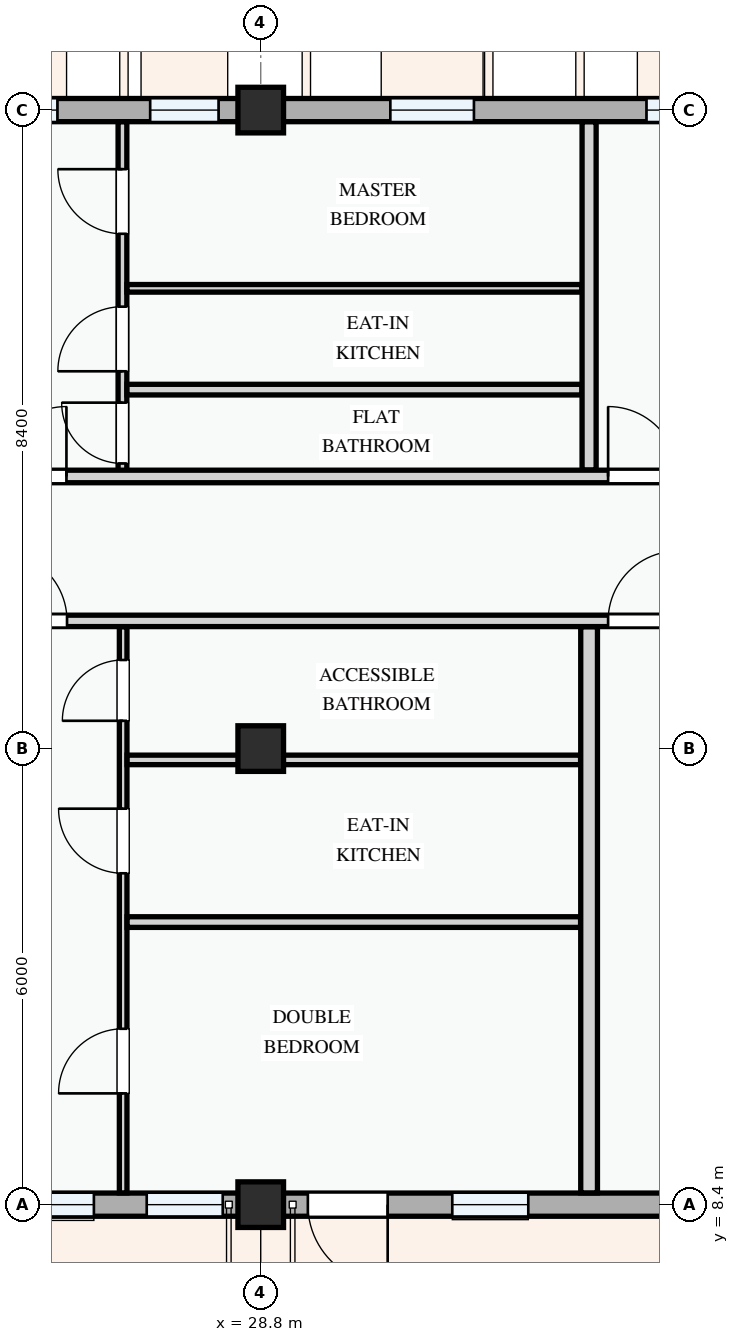
"""IFC4 building model, lengths in metres.
Left out: names, types, materials, properties, quantities, classifications, styles, units other than length and angle.
Written with IfcOpenShell. Run it as: python <this file> out.ifc"""

import sys

from ifc_helpers import new_model, si_unit, direction, frame, frame_2d, origin, origin_2d, place, context, subcontext, project, spatial, rectangle, extrude, element, fill, save


model = new_model("IFC4")
c1 = context("Model", 3, precision=1e-05, world=origin(), true_north=direction((0.0, 1.0)))
c2 = subcontext(c1, "Body", "Model", "MODEL_VIEW")
j1 = project(units=[si_unit("LENGTHUNIT", "METRE"), si_unit("PLANEANGLEUNIT", "RADIAN")], contexts=[c1])
p1 = place(None, origin())
s1 = spatial("IfcSite", under=j1, at=p1, CompositionType="ELEMENT")
p2 = place(p1, origin())
s2 = spatial("IfcBuilding", under=s1, at=p2, CompositionType="ELEMENT")
p3 = place(p2, frame((0.0, 0.0, 18.0)))
s3 = spatial("IfcBuildingStorey", under=s2, at=p3, CompositionType="ELEMENT", Elevation=18.0)
for number, where, z_axis, x_axis in (
    (1, (28.8, 8.4, 0.0), (0.0, 0.0, 1.0), (1.0, 0.0, 0.0)),
    (2, (28.8, 14.4, 0.0), (0.0, 0.0, 1.0), (1.0, 0.0, 0.0)),
    (3, (28.8, 22.8, 0.0), (0.0, 0.0, 1.0), (1.0, 0.0, 0.0)),
):
    element("IfcColumn", number, at=place(p3, frame(where, z_axis=z_axis, x_axis=x_axis)), inside=s3, PredefinedType="COLUMN", context=c2, shape_type="SweptSolid", body=[
        extrude(rectangle(XDim=0.6, YDim=0.6, at=origin_2d()), origin(), (0.0, 0.0, 1.0), 3.3),
    ])
p4 = place(p3, frame((22.8, 8.4, 0.0), z_axis=(0.0, 0.0, 1.0), x_axis=(1.0, 0.0, 0.0)))
e4 = element("IfcWall", 4, at=p4, inside=s3, PredefinedType="STANDARD", context=c2, shape_type="SweptSolid", body=[
    extrude(rectangle(XDim=6.0, YDim=0.305, at=frame_2d((3.0, 0.0))), origin(), (0.0, 0.0, 1.0), 2.475),
])
p5 = place(p4, frame((0.62, 0.0, 0.0)))
e5 = element("IfcOpeningElement", 5, at=p5, cuts=e4, PredefinedType="OPENING", context=c2, shape_type="SweptSolid", body=[
    extrude(rectangle(XDim=1.6, YDim=2.2, at=frame_2d((0.8, 1.1))), frame((0.0, 0.163, 0.0), z_axis=(0.0, -1.0, 0.0), x_axis=(1.0, 0.0, 0.0)), (0.0, 0.0, 1.0), 0.325),
])
p6 = place(p4, frame((2.655, 0.0, 0.78)))
e6 = element("IfcOpeningElement", 6, at=p6, cuts=e4, PredefinedType="OPENING", context=c2, shape_type="SweptSolid", body=[
    extrude(rectangle(XDim=1.15, YDim=1.25, at=frame_2d((0.575, 0.625))), frame((0.0, 0.163, 0.0), z_axis=(0.0, -1.0, 0.0), x_axis=(1.0, 0.0, 0.0)), (0.0, 0.0, 1.0), 0.325),
])
p7 = place(p4, frame((4.5, 0.0, 0.78)))
e7 = element("IfcOpeningElement", 7, at=p7, cuts=e4, PredefinedType="OPENING", context=c2, shape_type="SweptSolid", body=[
    extrude(rectangle(XDim=1.0, YDim=1.25, at=frame_2d((0.5, 0.625))), frame((0.0, 0.163, 0.0), z_axis=(0.0, -1.0, 0.0), x_axis=(1.0, 0.0, 0.0)), (0.0, 0.0, 1.0), 0.325),
])
p8 = place(p3, frame((28.8, 8.4, 0.0), z_axis=(0.0, 0.0, 1.0), x_axis=(1.0, 0.0, 0.0)))
e8 = element("IfcWall", 8, at=p8, inside=s3, PredefinedType="STANDARD", context=c2, shape_type="SweptSolid", body=[
    extrude(rectangle(XDim=8.4, YDim=0.305, at=frame_2d((4.2, 0.0))), origin(), (0.0, 0.0, 1.0), 2.375),
])
p9 = place(p8, frame((0.62, 0.0, 0.0)))
e9 = element("IfcOpeningElement", 9, at=p9, cuts=e8, PredefinedType="OPENING", context=c2, shape_type="SweptSolid", body=[
    extrude(rectangle(XDim=1.05, YDim=2.15, at=frame_2d((0.525, 1.075))), frame((0.0, 0.163, 0.0), z_axis=(0.0, -1.0, 0.0), x_axis=(1.0, 0.0, 0.0)), (0.0, 0.0, 1.0), 0.325),
])
p10 = place(p8, frame((2.52, 0.0, 0.78)))
e10 = element("IfcOpeningElement", 10, at=p10, cuts=e8, PredefinedType="OPENING", context=c2, shape_type="SweptSolid", body=[
    extrude(rectangle(XDim=1.0, YDim=1.25, at=frame_2d((0.5, 0.625))), frame((0.0, 0.163, 0.0), z_axis=(0.0, -1.0, 0.0), x_axis=(1.0, 0.0, 0.0)), (0.0, 0.0, 1.0), 0.325),
])
p11 = place(p8, frame((5.615, 0.0, 0.78)))
e11 = element("IfcOpeningElement", 11, at=p11, cuts=e8, PredefinedType="OPENING", context=c2, shape_type="SweptSolid", body=[
    extrude(rectangle(XDim=1.3, YDim=1.4, at=frame_2d((0.65, 0.7))), frame((0.0, 0.163, 0.0), z_axis=(0.0, -1.0, 0.0), x_axis=(1.0, 0.0, 0.0)), (0.0, 0.0, 1.0), 0.325),
])
p12 = place(p3, frame((37.2, 22.8, 0.0), z_axis=(0.0, 0.0, 1.0), x_axis=(-1.0, 0.0, 0.0)))
e12 = element("IfcWall", 12, at=p12, inside=s3, PredefinedType="STANDARD", context=c2, shape_type="SweptSolid", body=[
    extrude(rectangle(XDim=8.4, YDim=0.305, at=frame_2d((4.2, 0.0))), origin(), (0.0, 0.0, 1.0), 2.375),
])
p13 = place(p12, frame((0.945, 0.0, 0.78)))
e13 = element("IfcOpeningElement", 13, at=p13, cuts=e12, PredefinedType="OPENING", context=c2, shape_type="SweptSolid", body=[
    extrude(rectangle(XDim=2.38, YDim=1.48, at=frame_2d((1.19, 0.74))), frame((0.0, 0.163, 0.0), z_axis=(0.0, -1.0, 0.0), x_axis=(1.0, 0.0, 0.0)), (0.0, 0.0, 1.0), 0.325),
])
p14 = place(p12, frame((5.595, 0.0, 0.78)))
e14 = element("IfcOpeningElement", 14, at=p14, cuts=e12, PredefinedType="OPENING", context=c2, shape_type="SweptSolid", body=[
    extrude(rectangle(XDim=1.1, YDim=1.3, at=frame_2d((0.55, 0.65))), frame((0.0, 0.163, 0.0), z_axis=(0.0, -1.0, 0.0), x_axis=(1.0, 0.0, 0.0)), (0.0, 0.0, 1.0), 0.325),
])
p15 = place(p3, frame((28.8, 22.8, 0.0), z_axis=(0.0, 0.0, 1.0), x_axis=(-1.0, 0.0, 0.0)))
e15 = element("IfcWall", 15, at=p15, inside=s3, PredefinedType="STANDARD", context=c2, shape_type="SweptSolid", body=[
    extrude(rectangle(XDim=6.0, YDim=0.305, at=frame_2d((3.0, 0.0))), origin(), (0.0, 0.0, 1.0), 2.475),
])
p16 = place(p15, frame((0.555, 0.0, 0.78)))
e16 = element("IfcOpeningElement", 16, at=p16, cuts=e15, PredefinedType="OPENING", context=c2, shape_type="SweptSolid", body=[
    extrude(rectangle(XDim=0.9, YDim=1.2, at=frame_2d((0.45, 0.6))), frame((0.0, 0.163, 0.0), z_axis=(0.0, -1.0, 0.0), x_axis=(1.0, 0.0, 0.0)), (0.0, 0.0, 1.0), 0.325),
])
p17 = place(p15, frame((2.675, 0.0, 0.78)))
e17 = element("IfcOpeningElement", 17, at=p17, cuts=e15, PredefinedType="OPENING", context=c2, shape_type="SweptSolid", body=[
    extrude(rectangle(XDim=2.28, YDim=1.46, at=frame_2d((1.14, 0.73))), frame((0.0, 0.163, 0.0), z_axis=(0.0, -1.0, 0.0), x_axis=(1.0, 0.0, 0.0)), (0.0, 0.0, 1.0), 0.325),
])
p18 = place(p3, frame((26.99, 8.554, 0.0), z_axis=(0.0, 0.0, 1.0), x_axis=(0.0, 1.0, 0.0)))
e18 = element("IfcWall", 18, at=p18, inside=s3, PredefinedType="PARTITIONING", context=c2, shape_type="SweptSolid", body=[
    extrude(rectangle(XDim=7.448, YDim=0.1, at=frame_2d((3.724, 0.0))), origin(), (0.0, 0.0, 1.0), 3.0),
])
p19 = place(p18, frame((1.309, 0.0, 0.0)))
e19 = element("IfcOpeningElement", 19, at=p19, cuts=e18, PredefinedType="OPENING", context=c2, shape_type="SweptSolid", body=[
    extrude(rectangle(XDim=0.85, YDim=2.1, at=frame_2d((0.425, 1.05))), frame((0.0, 0.06, 0.0), z_axis=(0.0, -1.0, 0.0), x_axis=(1.0, 0.0, 0.0)), (0.0, 0.0, 1.0), 0.12),
])
p20 = place(p18, frame((4.205, 0.0, 0.0)))
e20 = element("IfcOpeningElement", 20, at=p20, cuts=e18, PredefinedType="OPENING", context=c2, shape_type="SweptSolid", body=[
    extrude(rectangle(XDim=0.85, YDim=2.1, at=frame_2d((0.425, 1.05))), frame((0.0, 0.06, 0.0), z_axis=(0.0, -1.0, 0.0), x_axis=(1.0, 0.0, 0.0)), (0.0, 0.0, 1.0), 0.12),
])
p21 = place(p18, frame((6.211, 0.0, 0.0)))
e21 = element("IfcOpeningElement", 21, at=p21, cuts=e18, PredefinedType="OPENING", context=c2, shape_type="SweptSolid", body=[
    extrude(rectangle(XDim=0.8, YDim=2.1, at=frame_2d((0.4, 1.05))), frame((0.0, 0.06, 0.0), z_axis=(0.0, -1.0, 0.0), x_axis=(1.0, 0.0, 0.0)), (0.0, 0.0, 1.0), 0.12),
])
p22 = place(p3, frame((27.042, 12.118, 0.0), z_axis=(0.0, 0.0, 1.0), x_axis=(1.0, 0.0, 0.0)))
e22 = element("IfcWall", 22, at=p22, inside=s3, PredefinedType="PARTITIONING", context=c2, shape_type="SweptSolid", body=[
    extrude(rectangle(XDim=5.966, YDim=0.14, at=frame_2d((2.983, 0.0))), origin(), (0.0, 0.0, 1.0), 3.0),
])
p23 = place(p3, frame((27.042, 14.251, 0.0), z_axis=(0.0, 0.0, 1.0), x_axis=(1.0, 0.0, 0.0)))
e23 = element("IfcWall", 23, at=p23, inside=s3, PredefinedType="PARTITIONING", context=c2, shape_type="SweptSolid", body=[
    extrude(rectangle(XDim=5.966, YDim=0.125, at=frame_2d((2.983, 0.0))), origin(), (0.0, 0.0, 1.0), 2.375),
])
p24 = place(p3, frame((26.981, 17.98, 0.0), z_axis=(0.0, 0.0, 1.0), x_axis=(0.0, 1.0, 0.0)))
e24 = element("IfcWall", 24, at=p24, inside=s3, PredefinedType="PARTITIONING", context=c2, shape_type="SweptSolid", body=[
    extrude(rectangle(XDim=4.666, YDim=0.115, at=frame_2d((2.333, 0.0))), origin(), (0.0, 0.0, 1.0), 3.0),
])
p25 = place(p24, frame((0.171, 0.0, 0.0)))
e25 = element("IfcOpeningElement", 25, at=p25, cuts=e24, PredefinedType="OPENING", context=c2, shape_type="SweptSolid", body=[
    extrude(rectangle(XDim=0.8, YDim=2.1, at=frame_2d((0.4, 1.05))), frame((0.0, 0.067, 0.0), z_axis=(0.0, -1.0, 0.0), x_axis=(1.0, 0.0, 0.0)), (0.0, 0.0, 1.0), 0.135),
])
p26 = place(p24, frame((1.384, 0.0, 0.0)))
e26 = element("IfcOpeningElement", 26, at=p26, cuts=e24, PredefinedType="OPENING", context=c2, shape_type="SweptSolid", body=[
    extrude(rectangle(XDim=0.85, YDim=2.1, at=frame_2d((0.425, 1.05))), frame((0.0, 0.067, 0.0), z_axis=(0.0, -1.0, 0.0), x_axis=(1.0, 0.0, 0.0)), (0.0, 0.0, 1.0), 0.135),
])
p27 = place(p24, frame((3.193, 0.0, 0.0)))
e27 = element("IfcOpeningElement", 27, at=p27, cuts=e24, PredefinedType="OPENING", context=c2, shape_type="SweptSolid", body=[
    extrude(rectangle(XDim=0.85, YDim=2.1, at=frame_2d((0.425, 1.05))), frame((0.0, 0.067, 0.0), z_axis=(0.0, -1.0, 0.0), x_axis=(1.0, 0.0, 0.0)), (0.0, 0.0, 1.0), 0.135),
])
p28 = place(p3, frame((27.04, 20.455, 0.0), z_axis=(0.0, 0.0, 1.0), x_axis=(1.0, 0.0, 0.0)))
e28 = element("IfcWall", 28, at=p28, inside=s3, PredefinedType="PARTITIONING", context=c2, shape_type="SweptSolid", body=[
    extrude(rectangle(XDim=5.985, YDim=0.1, at=frame_2d((2.993, 0.0))), origin(), (0.0, 0.0, 1.0), 3.0),
])
p29 = place(p3, frame((27.04, 19.122, 0.0), z_axis=(0.0, 0.0, 1.0), x_axis=(1.0, 0.0, 0.0)))
e29 = element("IfcWall", 29, at=p29, inside=s3, PredefinedType="PARTITIONING", context=c2, shape_type="SweptSolid", body=[
    extrude(rectangle(XDim=5.985, YDim=0.14, at=frame_2d((2.993, 0.0))), origin(), (0.0, 0.0, 1.0), 3.0),
])
p30 = place(p3, frame((33.12, 8.554, 0.0), z_axis=(0.0, 0.0, 1.0), x_axis=(0.0, 1.0, 0.0)))
e30 = element("IfcWall", 30, at=p30, inside=s3, PredefinedType="PARTITIONING", context=c2, shape_type="SweptSolid", body=[
    extrude(rectangle(XDim=7.448, YDim=0.22, at=frame_2d((3.724, 0.0))), origin(), (0.0, 0.0, 1.0), 2.585),
])
p31 = place(p3, frame((33.12, 18.064, 0.0), z_axis=(0.0, 0.0, 1.0), x_axis=(0.0, 1.0, 0.0)))
e31 = element("IfcWall", 31, at=p31, inside=s3, PredefinedType="PARTITIONING", context=c2, shape_type="SweptSolid", body=[
    extrude(rectangle(XDim=4.581, YDim=0.185, at=frame_2d((2.291, 0.0))), origin(), (0.0, 0.0, 1.0), 2.585),
])
p32 = place(p3, frame((22.66, 16.08, 0.0), z_axis=(0.0, 0.0, 1.0), x_axis=(1.0, 0.0, 0.0)))
e32 = element("IfcWall", 32, at=p32, inside=s3, PredefinedType="PARTITIONING", context=c2, shape_type="SweptSolid", body=[
    extrude(rectangle(XDim=34.88, YDim=0.15, at=frame_2d((17.44, 0.0))), origin(), (0.0, 0.0, 1.0), 3.0),
])
p33 = place(p32, frame((2.672, 0.0, 0.0)))
e33 = element("IfcOpeningElement", 33, at=p33, cuts=e32, PredefinedType="OPENING", context=c2, shape_type="SweptSolid", body=[
    extrude(rectangle(XDim=0.92, YDim=2.1, at=frame_2d((0.46, 1.05))), frame((0.0, 0.085, 0.0), z_axis=(0.0, -1.0, 0.0), x_axis=(1.0, 0.0, 0.0)), (0.0, 0.0, 1.0), 0.17),
])
p34 = place(p32, frame((10.71, 0.0, 0.0)))
e34 = element("IfcOpeningElement", 34, at=p34, cuts=e32, PredefinedType="OPENING", context=c2, shape_type="SweptSolid", body=[
    extrude(rectangle(XDim=0.92, YDim=2.1, at=frame_2d((0.46, 1.05))), frame((0.0, 0.085, 0.0), z_axis=(0.0, -1.0, 0.0), x_axis=(1.0, 0.0, 0.0)), (0.0, 0.0, 1.0), 0.17),
])
p35 = place(p32, frame((24.28, 0.0, 0.0)))
e35 = element("IfcOpeningElement", 35, at=p35, cuts=e32, PredefinedType="OPENING", context=c2, shape_type="SweptSolid", body=[
    extrude(rectangle(XDim=0.96, YDim=2.12, at=frame_2d((0.48, 1.06))), frame((0.0, 0.085, 0.0), z_axis=(0.0, -1.0, 0.0), x_axis=(1.0, 0.0, 0.0)), (0.0, 0.0, 1.0), 0.17),
])
p36 = place(p3, frame((22.66, 17.98, 0.0), z_axis=(0.0, 0.0, 1.0), x_axis=(1.0, 0.0, 0.0)))
e36 = element("IfcWall", 36, at=p36, inside=s3, PredefinedType="PARTITIONING", context=c2, shape_type="SweptSolid", body=[
    extrude(rectangle(XDim=34.88, YDim=0.165, at=frame_2d((17.44, 0.0))), origin(), (0.0, 0.0, 1.0), 3.0),
])
p37 = place(p36, frame((2.664, 0.0, 0.0)))
e37 = element("IfcOpeningElement", 37, at=p37, cuts=e36, PredefinedType="OPENING", context=c2, shape_type="SweptSolid", body=[
    extrude(rectangle(XDim=0.92, YDim=2.1, at=frame_2d((0.46, 1.05))), frame((0.0, 0.093, 0.0), z_axis=(0.0, -1.0, 0.0), x_axis=(1.0, 0.0, 0.0)), (0.0, 0.0, 1.0), 0.185),
])
p38 = place(p36, frame((10.71, 0.0, 0.0)))
e38 = element("IfcOpeningElement", 38, at=p38, cuts=e36, PredefinedType="OPENING", context=c2, shape_type="SweptSolid", body=[
    extrude(rectangle(XDim=0.92, YDim=2.1, at=frame_2d((0.46, 1.05))), frame((0.0, 0.093, 0.0), z_axis=(0.0, -1.0, 0.0), x_axis=(1.0, 0.0, 0.0)), (0.0, 0.0, 1.0), 0.185),
])
p39 = place(p36, frame((24.254, 0.0, 0.0)))
e39 = element("IfcOpeningElement", 39, at=p39, cuts=e36, PredefinedType="OPENING", context=c2, shape_type="SweptSolid", body=[
    extrude(rectangle(XDim=0.92, YDim=2.1, at=frame_2d((0.46, 1.05))), frame((0.0, 0.093, 0.0), z_axis=(0.0, -1.0, 0.0), x_axis=(1.0, 0.0, 0.0)), (0.0, 0.0, 1.0), 0.185),
])
p40 = place(p6, origin())
e40 = element("IfcWindow", 40, at=p40, inside=s3, PartitioningType="SINGLE_PANEL", PredefinedType="WINDOW", context=c2, shape_type="SweptSolid", body=[
    extrude(rectangle(XDim=1.15, YDim=1.25, at=frame_2d((0.575, 0.625))), frame((0.0, 0.03, 0.0), z_axis=(0.0, -1.0, 0.0), x_axis=(1.0, 0.0, 0.0)), (0.0, 0.0, 1.0), 0.06),
])
fill(e6, e40)
p41 = place(p7, origin())
e41 = element("IfcWindow", 41, at=p41, inside=s3, PartitioningType="SINGLE_PANEL", PredefinedType="WINDOW", context=c2, shape_type="SweptSolid", body=[
    extrude(rectangle(XDim=1.0, YDim=1.25, at=frame_2d((0.5, 0.625))), frame((0.0, 0.03, 0.0), z_axis=(0.0, -1.0, 0.0), x_axis=(1.0, 0.0, 0.0)), (0.0, 0.0, 1.0), 0.06),
])
fill(e7, e41)
p42 = place(p9, frame((1.05, 0.0, 0.0), z_axis=(0.0, 0.0, 1.0), x_axis=(-1.0, 0.0, 0.0)))
e42 = element("IfcDoor", 42, at=p42, inside=s3, OperationType="SINGLE_SWING_LEFT", PredefinedType="DOOR", context=c2, shape_type="SweptSolid", body=[
    extrude(rectangle(XDim=1.05, YDim=2.15, at=frame_2d((0.525, 1.075))), frame((0.0, 0.025, 0.0), z_axis=(0.0, -1.0, 0.0), x_axis=(1.0, 0.0, 0.0)), (0.0, 0.0, 1.0), 0.05),
])
fill(e9, e42)
p43 = place(p10, origin())
e43 = element("IfcWindow", 43, at=p43, inside=s3, PartitioningType="SINGLE_PANEL", PredefinedType="WINDOW", context=c2, shape_type="SweptSolid", body=[
    extrude(rectangle(XDim=1.0, YDim=1.25, at=frame_2d((0.5, 0.625))), frame((0.0, 0.03, 0.0), z_axis=(0.0, -1.0, 0.0), x_axis=(1.0, 0.0, 0.0)), (0.0, 0.0, 1.0), 0.06),
])
fill(e10, e43)
p44 = place(p13, origin())
e44 = element("IfcWindow", 44, at=p44, inside=s3, PartitioningType="DOUBLE_PANEL_VERTICAL", PredefinedType="WINDOW", context=c2, shape_type="SweptSolid", body=[
    extrude(rectangle(XDim=2.38, YDim=1.48, at=frame_2d((1.19, 0.74))), frame((0.0, 0.03, 0.0), z_axis=(0.0, -1.0, 0.0), x_axis=(1.0, 0.0, 0.0)), (0.0, 0.0, 1.0), 0.06),
])
fill(e13, e44)
p45 = place(p14, origin())
e45 = element("IfcWindow", 45, at=p45, inside=s3, PartitioningType="SINGLE_PANEL", PredefinedType="WINDOW", context=c2, shape_type="SweptSolid", body=[
    extrude(rectangle(XDim=1.1, YDim=1.3, at=frame_2d((0.55, 0.65))), frame((0.0, 0.03, 0.0), z_axis=(0.0, -1.0, 0.0), x_axis=(1.0, 0.0, 0.0)), (0.0, 0.0, 1.0), 0.06),
])
fill(e14, e45)
p46 = place(p16, origin())
e46 = element("IfcWindow", 46, at=p46, inside=s3, PartitioningType="SINGLE_PANEL", PredefinedType="WINDOW", context=c2, shape_type="SweptSolid", body=[
    extrude(rectangle(XDim=0.9, YDim=1.2, at=frame_2d((0.45, 0.6))), frame((0.0, 0.03, 0.0), z_axis=(0.0, -1.0, 0.0), x_axis=(1.0, 0.0, 0.0)), (0.0, 0.0, 1.0), 0.06),
])
fill(e16, e46)
p47 = place(p17, origin())
e47 = element("IfcWindow", 47, at=p47, inside=s3, PartitioningType="DOUBLE_PANEL_VERTICAL", PredefinedType="WINDOW", context=c2, shape_type="SweptSolid", body=[
    extrude(rectangle(XDim=2.28, YDim=1.46, at=frame_2d((1.14, 0.73))), frame((0.0, 0.03, 0.0), z_axis=(0.0, -1.0, 0.0), x_axis=(1.0, 0.0, 0.0)), (0.0, 0.0, 1.0), 0.06),
])
fill(e17, e47)
p48 = place(p19, origin())
e48 = element("IfcDoor", 48, at=p48, inside=s3, OperationType="SINGLE_SWING_LEFT", PredefinedType="DOOR", context=c2, shape_type="SweptSolid", body=[
    extrude(rectangle(XDim=0.85, YDim=2.1, at=frame_2d((0.425, 1.05))), frame((0.0, 0.025, 0.0), z_axis=(0.0, -1.0, 0.0), x_axis=(1.0, 0.0, 0.0)), (0.0, 0.0, 1.0), 0.05),
])
fill(e19, e48)
p49 = place(p20, origin())
e49 = element("IfcDoor", 49, at=p49, inside=s3, OperationType="SINGLE_SWING_RIGHT", PredefinedType="DOOR", context=c2, shape_type="SweptSolid", body=[
    extrude(rectangle(XDim=0.85, YDim=2.1, at=frame_2d((0.425, 1.05))), frame((0.0, 0.025, 0.0), z_axis=(0.0, -1.0, 0.0), x_axis=(1.0, 0.0, 0.0)), (0.0, 0.0, 1.0), 0.05),
])
fill(e20, e49)
p50 = place(p21, origin())
e50 = element("IfcDoor", 50, at=p50, inside=s3, OperationType="SINGLE_SWING_LEFT", PredefinedType="DOOR", context=c2, shape_type="SweptSolid", body=[
    extrude(rectangle(XDim=0.8, YDim=2.1, at=frame_2d((0.4, 1.05))), frame((0.0, 0.025, 0.0), z_axis=(0.0, -1.0, 0.0), x_axis=(1.0, 0.0, 0.0)), (0.0, 0.0, 1.0), 0.05),
])
fill(e21, e50)
p51 = place(p25, origin())
e51 = element("IfcDoor", 51, at=p51, inside=s3, OperationType="SINGLE_SWING_RIGHT", PredefinedType="DOOR", context=c2, shape_type="SweptSolid", body=[
    extrude(rectangle(XDim=0.8, YDim=2.1, at=frame_2d((0.4, 1.05))), frame((0.0, 0.025, 0.0), z_axis=(0.0, -1.0, 0.0), x_axis=(1.0, 0.0, 0.0)), (0.0, 0.0, 1.0), 0.05),
])
fill(e25, e51)
p52 = place(p26, origin())
e52 = element("IfcDoor", 52, at=p52, inside=s3, OperationType="SINGLE_SWING_LEFT", PredefinedType="DOOR", context=c2, shape_type="SweptSolid", body=[
    extrude(rectangle(XDim=0.85, YDim=2.1, at=frame_2d((0.425, 1.05))), frame((0.0, 0.025, 0.0), z_axis=(0.0, -1.0, 0.0), x_axis=(1.0, 0.0, 0.0)), (0.0, 0.0, 1.0), 0.05),
])
fill(e26, e52)
p53 = place(p27, origin())
e53 = element("IfcDoor", 53, at=p53, inside=s3, OperationType="SINGLE_SWING_RIGHT", PredefinedType="DOOR", context=c2, shape_type="SweptSolid", body=[
    extrude(rectangle(XDim=0.85, YDim=2.1, at=frame_2d((0.425, 1.05))), frame((0.0, 0.025, 0.0), z_axis=(0.0, -1.0, 0.0), x_axis=(1.0, 0.0, 0.0)), (0.0, 0.0, 1.0), 0.05),
])
fill(e27, e53)
p54 = place(p33, origin())
e54 = element("IfcDoor", 54, at=p54, inside=s3, OperationType="SINGLE_SWING_LEFT", PredefinedType="DOOR", context=c2, shape_type="SweptSolid", body=[
    extrude(rectangle(XDim=0.92, YDim=2.1, at=frame_2d((0.46, 1.05))), frame((0.0, 0.025, 0.0), z_axis=(0.0, -1.0, 0.0), x_axis=(1.0, 0.0, 0.0)), (0.0, 0.0, 1.0), 0.05),
])
fill(e33, e54)
p55 = place(p34, origin())
e55 = element("IfcDoor", 55, at=p55, inside=s3, OperationType="SINGLE_SWING_RIGHT", PredefinedType="DOOR", context=c2, shape_type="SweptSolid", body=[
    extrude(rectangle(XDim=0.92, YDim=2.1, at=frame_2d((0.46, 1.05))), frame((0.0, 0.025, 0.0), z_axis=(0.0, -1.0, 0.0), x_axis=(1.0, 0.0, 0.0)), (0.0, 0.0, 1.0), 0.05),
])
fill(e34, e55)
p56 = place(p37, origin())
e56 = element("IfcDoor", 56, at=p56, inside=s3, OperationType="SINGLE_SWING_RIGHT", PredefinedType="DOOR", context=c2, shape_type="SweptSolid", body=[
    extrude(rectangle(XDim=0.92, YDim=2.1, at=frame_2d((0.46, 1.05))), frame((0.0, 0.025, 0.0), z_axis=(0.0, -1.0, 0.0), x_axis=(1.0, 0.0, 0.0)), (0.0, 0.0, 1.0), 0.05),
])
fill(e37, e56)
p57 = place(p38, origin())
e57 = element("IfcDoor", 57, at=p57, inside=s3, OperationType="SINGLE_SWING_LEFT", PredefinedType="DOOR", context=c2, shape_type="SweptSolid", body=[
    extrude(rectangle(XDim=0.92, YDim=2.1, at=frame_2d((0.46, 1.05))), frame((0.0, 0.025, 0.0), z_axis=(0.0, -1.0, 0.0), x_axis=(1.0, 0.0, 0.0)), (0.0, 0.0, 1.0), 0.05),
])
fill(e38, e57)
save(model, sys.argv[1])
